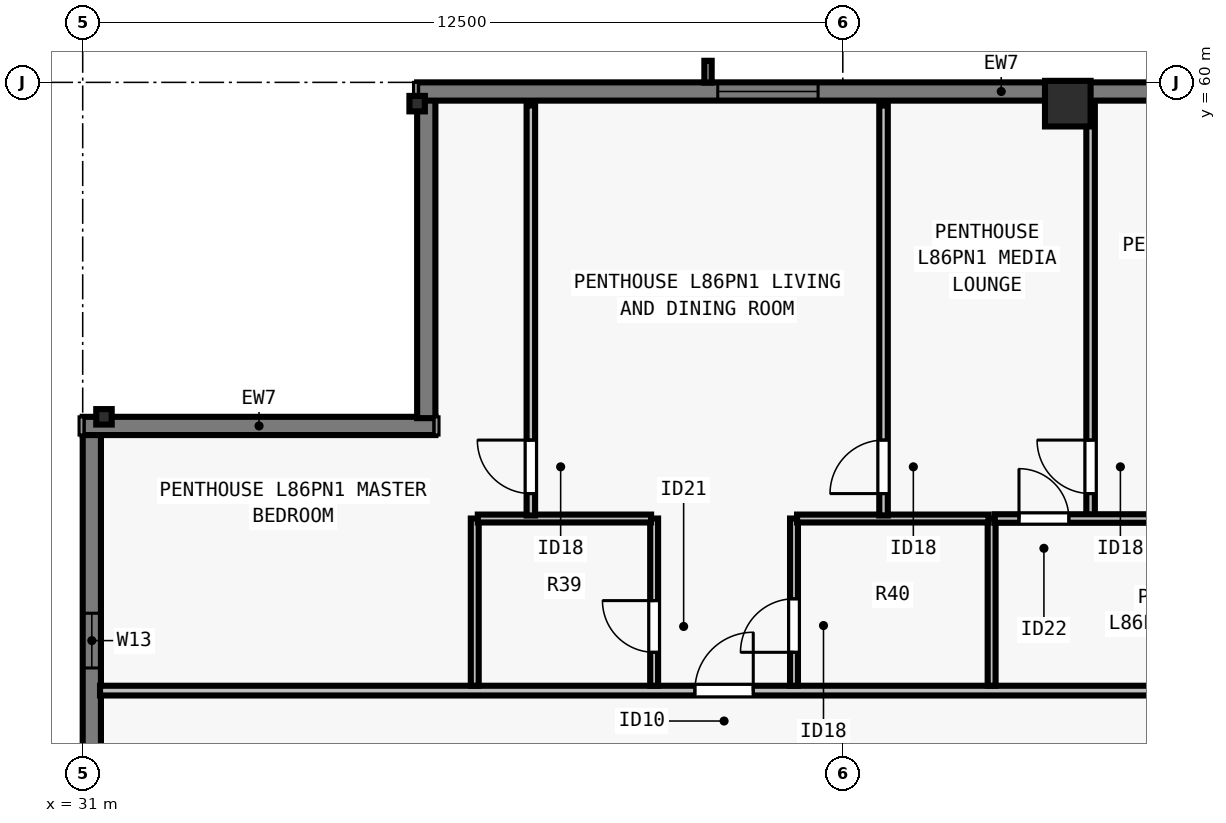
"""IFC4 building model, lengths in metres.
Left out: names, types, materials, properties, quantities, classifications, styles, units other than length and angle.
Written with IfcOpenShell. Run it as: python <this file> out.ifc"""

import sys

from ifc_helpers import new_model, si_unit, direction, frame, frame_2d, origin, origin_2d, place, context, subcontext, project, spatial, rectangle, i_section, extrude, element, fill, save


model = new_model("IFC4")
c1 = context("Model", 3, precision=1e-05, world=origin(), true_north=direction((0.0, 1.0)))
c2 = subcontext(c1, "Body", "Model", "MODEL_VIEW")
j1 = project(units=[si_unit("LENGTHUNIT", "METRE"), si_unit("PLANEANGLEUNIT", "RADIAN")], contexts=[c1])
p1 = place(None, origin())
s1 = spatial("IfcSite", under=j1, at=p1, CompositionType="ELEMENT")
p2 = place(p1, origin())
s2 = spatial("IfcBuilding", under=s1, at=p2, CompositionType="ELEMENT")
p3 = place(p2, frame((0.0, 0.0, 312.0)))
s3 = spatial("IfcBuildingStorey", under=s2, at=p3, CompositionType="ELEMENT", Elevation=312.0)
p4 = place(p3, frame((47.2, 59.65, 0.0), z_axis=(0.0, 0.0, 1.0), x_axis=(1.0, 0.0, 0.0)))
e1 = element("IfcColumn", 1, at=p4, inside=s3, PredefinedType="COLUMN", context=c2, shape_type="SweptSolid", body=[
    extrude(rectangle(XDim=0.75, YDim=0.75, at=origin_2d()), origin(), (0.0, 0.0, 1.0), 3.5),
])
for number, where, z_axis, x_axis in (
    (2, (36.5, 59.65, 0.0), (0.0, 0.0, 1.0), (1.0, 0.0, 0.0)),
    (3, (31.35, 54.5, 0.0), (0.0, 0.0, 1.0), (0.0, 1.0, 0.0)),
):
    element("IfcColumn", number, at=place(p3, frame(where, z_axis=z_axis, x_axis=x_axis)), inside=s3, PredefinedType="COLUMN", context=c2, shape_type="SweptSolid", body=[
        extrude(i_section(OverallWidth=0.254, OverallDepth=0.254, WebThickness=0.009, FlangeThickness=0.014, FilletRadius=0.013, at=origin_2d()), origin(), (0.0, 0.0, 1.0), 3.5),
    ])
p5 = place(p3, frame((31.15, 23.5, 0.0), z_axis=(0.0, 0.0, 1.0), x_axis=(0.0, 1.0, 0.0)))
e4 = element("IfcWall", 4, at=p5, inside=s3, PredefinedType="SOLIDWALL", context=c2, shape_type="SweptSolid", body=[
    extrude(rectangle(XDim=30.722, YDim=0.3, at=frame_2d((15.361, 0.0))), origin(), (0.0, 0.0, 1.0), 3.29),
])
p6 = place(p5, frame((4.944, 0.0, 0.8)))
e5 = element("IfcOpeningElement", 5, at=p6, cuts=e4, PredefinedType="OPENING", context=c2, shape_type="SweptSolid", body=[
    extrude(rectangle(XDim=1.65, YDim=1.758, at=frame_2d((0.825, 0.879))), frame((0.0, 0.16, 0.0), z_axis=(0.0, -1.0, 0.0), x_axis=(1.0, 0.0, 0.0)), (0.0, 0.0, 1.0), 0.32),
])
p7 = place(p5, frame((7.756, 0.0, 0.8)))
e6 = element("IfcOpeningElement", 6, at=p7, cuts=e4, PredefinedType="OPENING", context=c2, shape_type="SweptSolid", body=[
    extrude(rectangle(XDim=2.0, YDim=1.758, at=frame_2d((1.0, 0.879))), frame((0.0, 0.16, 0.0), z_axis=(0.0, -1.0, 0.0), x_axis=(1.0, 0.0, 0.0)), (0.0, 0.0, 1.0), 0.32),
])
p8 = place(p5, frame((12.617, 0.0, 0.8)))
e7 = element("IfcOpeningElement", 7, at=p8, cuts=e4, PredefinedType="OPENING", context=c2, shape_type="SweptSolid", body=[
    extrude(rectangle(XDim=1.65, YDim=1.758, at=frame_2d((0.825, 0.879))), frame((0.0, 0.16, 0.0), z_axis=(0.0, -1.0, 0.0), x_axis=(1.0, 0.0, 0.0)), (0.0, 0.0, 1.0), 0.32),
])
p9 = place(p5, frame((17.53, 0.0, 0.8)))
e8 = element("IfcOpeningElement", 8, at=p9, cuts=e4, PredefinedType="OPENING", context=c2, shape_type="SweptSolid", body=[
    extrude(rectangle(XDim=2.0, YDim=1.758, at=frame_2d((1.0, 0.879))), frame((0.0, 0.16, 0.0), z_axis=(0.0, -1.0, 0.0), x_axis=(1.0, 0.0, 0.0)), (0.0, 0.0, 1.0), 0.32),
])
p10 = place(p5, frame((21.142, 0.0, 0.8)))
e9 = element("IfcOpeningElement", 9, at=p10, cuts=e4, PredefinedType="OPENING", context=c2, shape_type="SweptSolid", body=[
    extrude(rectangle(XDim=1.65, YDim=1.758, at=frame_2d((0.825, 0.879))), frame((0.0, 0.16, 0.0), z_axis=(0.0, -1.0, 0.0), x_axis=(1.0, 0.0, 0.0)), (0.0, 0.0, 1.0), 0.32),
])
p11 = place(p5, frame((26.87, 0.0, 0.8)))
e10 = element("IfcOpeningElement", 10, at=p11, cuts=e4, PredefinedType="OPENING", context=c2, shape_type="SweptSolid", body=[
    extrude(rectangle(XDim=0.9, YDim=1.75, at=frame_2d((0.45, 0.875))), frame((0.0, 0.16, 0.0), z_axis=(0.0, -1.0, 0.0), x_axis=(1.0, 0.0, 0.0)), (0.0, 0.0, 1.0), 0.32),
])
p12 = place(p3, frame((31.0, 54.35, 0.0), z_axis=(0.0, 0.0, 1.0), x_axis=(1.0, 0.0, 0.0)))
e11 = element("IfcWall", 11, at=p12, inside=s3, PredefinedType="SOLIDWALL", context=c2, shape_type="SweptSolid", body=[
    extrude(rectangle(XDim=5.8, YDim=0.3, at=frame_2d((2.9, 0.0))), origin(), (0.0, 0.0, 1.0), 3.29),
])
p13 = place(p3, frame((36.65, 54.478, 0.0), z_axis=(0.0, 0.0, 1.0), x_axis=(0.0, 1.0, 0.0)))
e12 = element("IfcWall", 12, at=p13, inside=s3, PredefinedType="SOLIDWALL", context=c2, shape_type="SweptSolid", body=[
    extrude(rectangle(XDim=5.244, YDim=0.3, at=frame_2d((2.622, 0.0))), origin(), (0.0, 0.0, 1.0), 3.29),
])
p14 = place(p3, frame((36.5, 59.85, 0.0), z_axis=(0.0, 0.0, 1.0), x_axis=(1.0, 0.0, 0.0)))
e13 = element("IfcWall", 13, at=p14, inside=s3, PredefinedType="SOLIDWALL", context=c2, shape_type="SweptSolid", body=[
    extrude(rectangle(XDim=30.722, YDim=0.3, at=frame_2d((15.361, 0.0))), origin(), (0.0, 0.0, 1.0), 3.29),
])
p15 = place(p14, frame((4.944, 0.0, 0.8)))
e14 = element("IfcOpeningElement", 14, at=p15, cuts=e13, PredefinedType="OPENING", context=c2, shape_type="SweptSolid", body=[
    extrude(rectangle(XDim=1.65, YDim=1.758, at=frame_2d((0.825, 0.879))), frame((0.0, 0.16, 0.0), z_axis=(0.0, -1.0, 0.0), x_axis=(1.0, 0.0, 0.0)), (0.0, 0.0, 1.0), 0.32),
])
p16 = place(p14, frame((12.617, 0.0, 0.8)))
e15 = element("IfcOpeningElement", 15, at=p16, cuts=e13, PredefinedType="OPENING", context=c2, shape_type="SweptSolid", body=[
    extrude(rectangle(XDim=1.65, YDim=1.758, at=frame_2d((0.825, 0.879))), frame((0.0, 0.16, 0.0), z_axis=(0.0, -1.0, 0.0), x_axis=(1.0, 0.0, 0.0)), (0.0, 0.0, 1.0), 0.32),
])
p17 = place(p14, frame((16.28, 0.0, 0.8)))
e16 = element("IfcOpeningElement", 16, at=p17, cuts=e13, PredefinedType="OPENING", context=c2, shape_type="SweptSolid", body=[
    extrude(rectangle(XDim=2.0, YDim=1.758, at=frame_2d((1.0, 0.879))), frame((0.0, 0.16, 0.0), z_axis=(0.0, -1.0, 0.0), x_axis=(1.0, 0.0, 0.0)), (0.0, 0.0, 1.0), 0.32),
])
p18 = place(p14, frame((21.142, 0.0, 0.8)))
e17 = element("IfcOpeningElement", 17, at=p18, cuts=e13, PredefinedType="OPENING", context=c2, shape_type="SweptSolid", body=[
    extrude(rectangle(XDim=1.65, YDim=1.758, at=frame_2d((0.825, 0.879))), frame((0.0, 0.16, 0.0), z_axis=(0.0, -1.0, 0.0), x_axis=(1.0, 0.0, 0.0)), (0.0, 0.0, 1.0), 0.32),
])
p19 = place(p14, frame((23.954, 0.0, 0.8)))
e18 = element("IfcOpeningElement", 18, at=p19, cuts=e13, PredefinedType="OPENING", context=c2, shape_type="SweptSolid", body=[
    extrude(rectangle(XDim=2.0, YDim=1.758, at=frame_2d((1.0, 0.879))), frame((0.0, 0.16, 0.0), z_axis=(0.0, -1.0, 0.0), x_axis=(1.0, 0.0, 0.0)), (0.0, 0.0, 1.0), 0.32),
])
p20 = place(p3, frame((31.285, 49.998, 0.0), z_axis=(0.0, 0.0, 1.0), x_axis=(1.0, 0.0, 0.0)))
e19 = element("IfcWall", 19, at=p20, inside=s3, PredefinedType="PARTITIONING", context=c2, shape_type="SweptSolid", body=[
    extrude(rectangle(XDim=38.975, YDim=0.16, at=frame_2d((19.488, 0.0))), origin(), (0.0, 0.0, 1.0), 3.009),
])
p21 = place(p20, frame((9.782, 0.0, 0.0)))
e20 = element("IfcOpeningElement", 20, at=p21, cuts=e19, PredefinedType="OPENING", context=c2, shape_type="SweptSolid", body=[
    extrude(rectangle(XDim=0.96, YDim=2.18, at=frame_2d((0.48, 1.09))), frame((0.0, 0.09, 0.0), z_axis=(0.0, -1.0, 0.0), x_axis=(1.0, 0.0, 0.0)), (0.0, 0.0, 1.0), 0.18),
])
p22 = place(p20, frame((30.363, 0.0, 0.0)))
e21 = element("IfcOpeningElement", 21, at=p22, cuts=e19, PredefinedType="OPENING", context=c2, shape_type="SweptSolid", body=[
    extrude(rectangle(XDim=0.96, YDim=2.18, at=frame_2d((0.48, 1.09))), frame((0.0, 0.09, 0.0), z_axis=(0.0, -1.0, 0.0), x_axis=(1.0, 0.0, 0.0)), (0.0, 0.0, 1.0), 0.18),
])
p23 = place(p3, frame((37.448, 50.077, 0.0), z_axis=(0.0, 0.0, 1.0), x_axis=(0.0, 1.0, 0.0)))
e22 = element("IfcWall", 22, at=p23, inside=s3, PredefinedType="PLUMBINGWALL", context=c2, shape_type="SweptSolid", body=[
    extrude(rectangle(XDim=2.75, YDim=0.13, at=frame_2d((1.375, 0.0))), origin(), (0.0, 0.0, 1.0), 3.29),
])
p24 = place(p3, frame((40.397, 50.077, 0.0), z_axis=(0.0, 0.0, 1.0), x_axis=(0.0, 1.0, 0.0)))
e23 = element("IfcWall", 23, at=p24, inside=s3, PredefinedType="PLUMBINGWALL", context=c2, shape_type="SweptSolid", body=[
    extrude(rectangle(XDim=2.75, YDim=0.13, at=frame_2d((1.375, 0.0))), origin(), (0.0, 0.0, 1.0), 3.29),
])
p25 = place(p24, frame((0.55, 0.0, 0.0)))
e24 = element("IfcOpeningElement", 24, at=p25, cuts=e23, PredefinedType="OPENING", context=c2, shape_type="SweptSolid", body=[
    extrude(rectangle(XDim=0.85, YDim=2.08, at=frame_2d((0.425, 1.04))), frame((0.0, 0.075, 0.0), z_axis=(0.0, -1.0, 0.0), x_axis=(1.0, 0.0, 0.0)), (0.0, 0.0, 1.0), 0.15),
])
p26 = place(p3, frame((37.498, 52.827, 0.0), z_axis=(0.0, 0.0, 1.0), x_axis=(1.0, 0.0, 0.0)))
e25 = element("IfcWall", 25, at=p26, inside=s3, PredefinedType="PLUMBINGWALL", context=c2, shape_type="SweptSolid", body=[
    extrude(rectangle(XDim=2.85, YDim=0.13, at=frame_2d((1.425, 0.0))), origin(), (0.0, 0.0, 1.0), 3.29),
])
p27 = place(p3, frame((45.948, 50.077, 0.0), z_axis=(0.0, 0.0, 1.0), x_axis=(0.0, 1.0, 0.0)))
e26 = element("IfcWall", 26, at=p27, inside=s3, PredefinedType="PLUMBINGWALL", context=c2, shape_type="SweptSolid", body=[
    extrude(rectangle(XDim=2.75, YDim=0.13, at=frame_2d((1.375, 0.0))), origin(), (0.0, 0.0, 1.0), 3.29),
])
p28 = place(p3, frame((42.698, 50.077, 0.0), z_axis=(0.0, 0.0, 1.0), x_axis=(0.0, 1.0, 0.0)))
e27 = element("IfcWall", 27, at=p28, inside=s3, PredefinedType="PLUMBINGWALL", context=c2, shape_type="SweptSolid", body=[
    extrude(rectangle(XDim=2.75, YDim=0.13, at=frame_2d((1.375, 0.0))), origin(), (0.0, 0.0, 1.0), 3.29),
])
p29 = place(p28, frame((0.55, 0.0, 0.0)))
e28 = element("IfcOpeningElement", 28, at=p29, cuts=e27, PredefinedType="OPENING", context=c2, shape_type="SweptSolid", body=[
    extrude(rectangle(XDim=0.88, YDim=2.1, at=frame_2d((0.44, 1.05))), frame((0.0, 0.075, 0.0), z_axis=(0.0, -1.0, 0.0), x_axis=(1.0, 0.0, 0.0)), (0.0, 0.0, 1.0), 0.15),
])
p30 = place(p3, frame((42.748, 52.827, 0.0), z_axis=(0.0, 0.0, 1.0), x_axis=(1.0, 0.0, 0.0)))
e29 = element("IfcWall", 29, at=p30, inside=s3, PredefinedType="PLUMBINGWALL", context=c2, shape_type="SweptSolid", body=[
    extrude(rectangle(XDim=3.15, YDim=0.13, at=frame_2d((1.575, 0.0))), origin(), (0.0, 0.0, 1.0), 3.29),
])
p31 = place(p3, frame((38.37, 52.877, 0.0), z_axis=(0.0, 0.0, 1.0), x_axis=(0.0, 1.0, 0.0)))
e30 = element("IfcWall", 30, at=p31, inside=s3, PredefinedType="PARTITIONING", context=c2, shape_type="SweptSolid", body=[
    extrude(rectangle(XDim=6.743, YDim=0.14, at=frame_2d((3.371, 0.0))), origin(), (0.0, 0.0, 1.0), 2.653),
])
p32 = place(p31, frame((0.36, 0.0, 0.0)))
e31 = element("IfcOpeningElement", 31, at=p32, cuts=e30, PredefinedType="OPENING", context=c2, shape_type="SweptSolid", body=[
    extrude(rectangle(XDim=0.88, YDim=2.1, at=frame_2d((0.44, 1.05))), frame((0.0, 0.08, 0.0), z_axis=(0.0, -1.0, 0.0), x_axis=(1.0, 0.0, 0.0)), (0.0, 0.0, 1.0), 0.16),
])
p33 = place(p3, frame((47.575, 52.788, 0.0), z_axis=(0.0, 0.0, 1.0), x_axis=(0.0, 1.0, 0.0)))
e32 = element("IfcWall", 32, at=p33, inside=s3, PredefinedType="PARTITIONING", context=c2, shape_type="SweptSolid", body=[
    extrude(rectangle(XDim=6.833, YDim=0.14, at=frame_2d((3.416, 0.0))), origin(), (0.0, 0.0, 1.0), 3.29),
])
p34 = place(p33, frame((0.45, 0.0, 0.0)))
e33 = element("IfcOpeningElement", 33, at=p34, cuts=e32, PredefinedType="OPENING", context=c2, shape_type="SweptSolid", body=[
    extrude(rectangle(XDim=0.88, YDim=2.1, at=frame_2d((0.44, 1.05))), frame((0.0, 0.08, 0.0), z_axis=(0.0, -1.0, 0.0), x_axis=(1.0, 0.0, 0.0)), (0.0, 0.0, 1.0), 0.16),
])
p35 = place(p3, frame((45.998, 52.827, 0.0), z_axis=(0.0, 0.0, 1.0), x_axis=(1.0, 0.0, 0.0)))
e34 = element("IfcWall", 34, at=p35, inside=s3, PredefinedType="PARTITIONING", context=c2, shape_type="SweptSolid", body=[
    extrude(rectangle(XDim=5.728, YDim=0.14, at=frame_2d((2.864, 0.0))), origin(), (0.0, 0.0, 1.0), 3.29),
])
p36 = place(p35, frame((0.4, 0.0, 0.0)))
e35 = element("IfcOpeningElement", 35, at=p36, cuts=e34, PredefinedType="OPENING", context=c2, shape_type="SweptSolid", body=[
    extrude(rectangle(XDim=0.82, YDim=2.1, at=frame_2d((0.41, 1.05))), frame((0.0, 0.08, 0.0), z_axis=(0.0, -1.0, 0.0), x_axis=(1.0, 0.0, 0.0)), (0.0, 0.0, 1.0), 0.16),
])
p37 = place(p3, frame((44.17, 52.877, 0.0), z_axis=(0.0, 0.0, 1.0), x_axis=(0.0, 1.0, 0.0)))
e36 = element("IfcWall", 36, at=p37, inside=s3, PredefinedType="PARTITIONING", context=c2, shape_type="SweptSolid", body=[
    extrude(rectangle(XDim=6.743, YDim=0.14, at=frame_2d((3.371, 0.0))), origin(), (0.0, 0.0, 1.0), 3.29),
])
p38 = place(p37, frame((0.36, 0.0, 0.0)))
e37 = element("IfcOpeningElement", 37, at=p38, cuts=e36, PredefinedType="OPENING", context=c2, shape_type="SweptSolid", body=[
    extrude(rectangle(XDim=0.88, YDim=2.1, at=frame_2d((0.44, 1.05))), frame((0.0, 0.08, 0.0), z_axis=(0.0, -1.0, 0.0), x_axis=(1.0, 0.0, 0.0)), (0.0, 0.0, 1.0), 0.16),
])
p39 = place(p15, origin())
e38 = element("IfcWindow", 38, at=p39, inside=s3, PartitioningType="SINGLE_PANEL", PredefinedType="WINDOW", context=c2, shape_type="SweptSolid", body=[
    extrude(rectangle(XDim=1.65, YDim=1.758, at=frame_2d((0.825, 0.879))), frame((0.0, -0.05, 0.0), z_axis=(0.0, -1.0, 0.0), x_axis=(1.0, 0.0, 0.0)), (0.0, 0.0, 1.0), 0.06),
])
fill(e14, e38)
p40 = place(p11, origin())
e39 = element("IfcWindow", 39, at=p40, inside=s3, PartitioningType="SINGLE_PANEL", PredefinedType="WINDOW", context=c2, shape_type="SweptSolid", body=[
    extrude(rectangle(XDim=0.9, YDim=1.75, at=frame_2d((0.45, 0.875))), frame((0.0, -0.04, 0.0), z_axis=(0.0, -1.0, 0.0), x_axis=(1.0, 0.0, 0.0)), (0.0, 0.0, 1.0), 0.06),
])
fill(e10, e39)
p41 = place(p25, origin())
e40 = element("IfcDoor", 40, at=p41, inside=s3, OperationType="SINGLE_SWING_RIGHT", PredefinedType="DOOR", context=c2, shape_type="SweptSolid", body=[
    extrude(rectangle(XDim=0.85, YDim=2.08, at=frame_2d((0.425, 1.04))), frame((0.0, 0.025, 0.0), z_axis=(0.0, -1.0, 0.0), x_axis=(1.0, 0.0, 0.0)), (0.0, 0.0, 1.0), 0.05),
])
fill(e24, e40)
p42 = place(p29, origin())
e41 = element("IfcDoor", 41, at=p42, inside=s3, OperationType="SINGLE_SWING_LEFT", PredefinedType="DOOR", context=c2, shape_type="SweptSolid", body=[
    extrude(rectangle(XDim=0.88, YDim=2.1, at=frame_2d((0.44, 1.05))), frame((0.0, 0.025, 0.0), z_axis=(0.0, -1.0, 0.0), x_axis=(1.0, 0.0, 0.0)), (0.0, 0.0, 1.0), 0.05),
])
fill(e28, e41)
p43 = place(p32, origin())
e42 = element("IfcDoor", 42, at=p43, inside=s3, OperationType="SINGLE_SWING_RIGHT", PredefinedType="DOOR", context=c2, shape_type="SweptSolid", body=[
    extrude(rectangle(XDim=0.88, YDim=2.1, at=frame_2d((0.44, 1.05))), frame((0.0, 0.025, 0.0), z_axis=(0.0, -1.0, 0.0), x_axis=(1.0, 0.0, 0.0)), (0.0, 0.0, 1.0), 0.05),
])
fill(e31, e42)
p44 = place(p36, origin())
e43 = element("IfcDoor", 43, at=p44, inside=s3, OperationType="SINGLE_SWING_LEFT", PredefinedType="DOOR", context=c2, shape_type="SweptSolid", body=[
    extrude(rectangle(XDim=0.82, YDim=2.1, at=frame_2d((0.41, 1.05))), frame((0.0, 0.025, 0.0), z_axis=(0.0, -1.0, 0.0), x_axis=(1.0, 0.0, 0.0)), (0.0, 0.0, 1.0), 0.05),
])
fill(e35, e43)
p45 = place(p34, origin())
e44 = element("IfcDoor", 44, at=p45, inside=s3, OperationType="SINGLE_SWING_RIGHT", PredefinedType="DOOR", context=c2, shape_type="SweptSolid", body=[
    extrude(rectangle(XDim=0.88, YDim=2.1, at=frame_2d((0.44, 1.05))), frame((0.0, 0.025, 0.0), z_axis=(0.0, -1.0, 0.0), x_axis=(1.0, 0.0, 0.0)), (0.0, 0.0, 1.0), 0.05),
])
fill(e33, e44)
p46 = place(p38, origin())
e45 = element("IfcDoor", 45, at=p46, inside=s3, OperationType="SINGLE_SWING_LEFT", PredefinedType="DOOR", context=c2, shape_type="SweptSolid", body=[
    extrude(rectangle(XDim=0.88, YDim=2.1, at=frame_2d((0.44, 1.05))), frame((0.0, 0.025, 0.0), z_axis=(0.0, -1.0, 0.0), x_axis=(1.0, 0.0, 0.0)), (0.0, 0.0, 1.0), 0.05),
])
fill(e37, e45)
p47 = place(p21, origin())
e46 = element("IfcDoor", 46, at=p47, inside=s3, OperationType="SINGLE_SWING_RIGHT", PredefinedType="DOOR", context=c2, shape_type="SweptSolid", body=[
    extrude(rectangle(XDim=0.96, YDim=2.18, at=frame_2d((0.48, 1.09))), frame((0.0, 0.025, 0.0), z_axis=(0.0, -1.0, 0.0), x_axis=(1.0, 0.0, 0.0)), (0.0, 0.0, 1.0), 0.05),
])
fill(e20, e46)
save(model, sys.argv[1])
